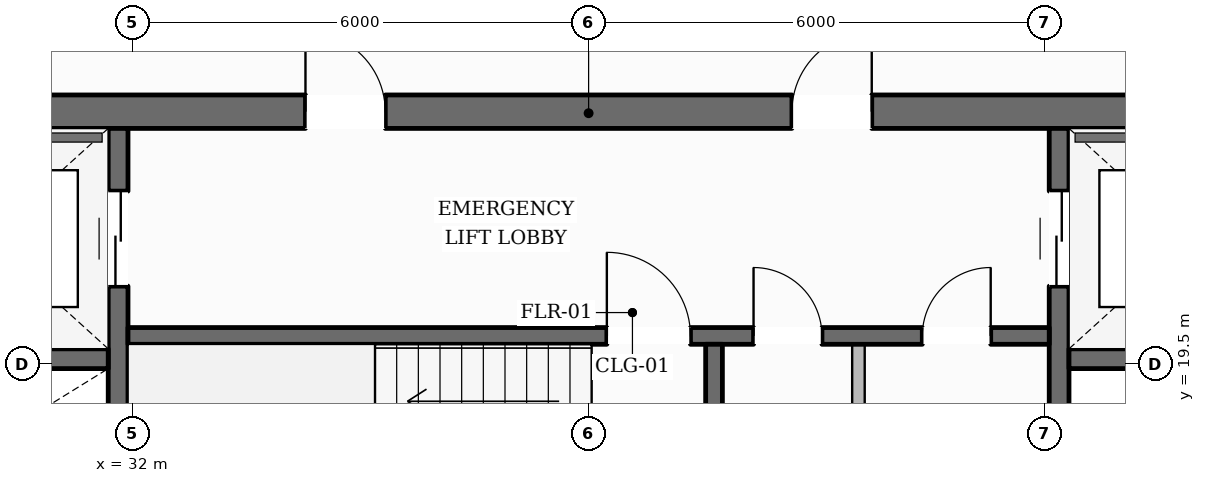
"""IFC4 building model, lengths in metres.
Left out: names, types, materials, properties, quantities, classifications, styles, units other than length and angle.
Written with IfcOpenShell. Run it as: python <this file> out.ifc"""

import sys

from ifc_helpers import new_model, si_unit, direction, frame, frame_2d, origin, place, context, subcontext, project, spatial, rectangle, extrude, element, fill, save


model = new_model("IFC4")
c1 = context("Model", 3, precision=1e-05, world=origin(), true_north=direction((0.0, 1.0)))
c2 = subcontext(c1, "Body", "Model", "MODEL_VIEW")
j1 = project(units=[si_unit("LENGTHUNIT", "METRE"), si_unit("PLANEANGLEUNIT", "RADIAN")], contexts=[c1])
p1 = place(None, origin())
s1 = spatial("IfcSite", under=j1, at=p1, CompositionType="ELEMENT")
p2 = place(p1, origin())
s2 = spatial("IfcBuilding", under=s1, at=p2, CompositionType="ELEMENT")
p3 = place(p2, frame((0.0, 0.0, 207.35)))
s3 = spatial("IfcBuildingStorey", under=s2, at=p3, CompositionType="ELEMENT", Elevation=207.35)
p4 = place(p3, frame((28.04, 22.82, 0.0), z_axis=(0.0, 0.0, 1.0), x_axis=(1.0, 0.0, 0.0)))
e1 = element("IfcWall", 1, at=p4, inside=s3, PredefinedType="SOLIDWALL", context=c2, shape_type="SweptSolid", body=[
    extrude(rectangle(XDim=19.92, YDim=0.44, at=frame_2d((9.96, 0.0))), origin(), (0.0, 0.0, 1.0), 3.6),
])
p5 = place(p4, frame((6.235, 0.0, 0.0)))
e2 = element("IfcOpeningElement", 2, at=p5, cuts=e1, PredefinedType="OPENING", context=c2, shape_type="SweptSolid", body=[
    extrude(rectangle(XDim=1.05, YDim=2.15, at=frame_2d((0.525, 1.075))), frame((0.0, 0.23, 0.0), z_axis=(0.0, -1.0, 0.0), x_axis=(1.0, 0.0, 0.0)), (0.0, 0.0, 1.0), 0.46),
])
p6 = place(p4, frame((12.635, 0.0, 0.0)))
e3 = element("IfcOpeningElement", 3, at=p6, cuts=e1, PredefinedType="OPENING", context=c2, shape_type="SweptSolid", body=[
    extrude(rectangle(XDim=1.05, YDim=2.15, at=frame_2d((0.525, 1.075))), frame((0.0, 0.23, 0.0), z_axis=(0.0, -1.0, 0.0), x_axis=(1.0, 0.0, 0.0)), (0.0, 0.0, 1.0), 0.46),
])
p7 = place(p3, frame((31.81, 9.6, 0.0), z_axis=(0.0, 0.0, 1.0), x_axis=(0.0, 1.0, 0.0)))
e4 = element("IfcWall", 4, at=p7, inside=s3, PredefinedType="SHEAR", context=c2, shape_type="SweptSolid", body=[
    extrude(rectangle(XDim=13.0, YDim=0.26, at=frame_2d((6.5, 0.0))), origin(), (0.0, 0.0, 1.0), 3.6),
])
p8 = place(p7, frame((10.925, 0.0, 0.0)))
e5 = element("IfcOpeningElement", 5, at=p8, cuts=e4, PredefinedType="OPENING", context=c2, shape_type="SweptSolid", body=[
    extrude(rectangle(XDim=1.25, YDim=2.25, at=frame_2d((0.625, 1.125))), frame((0.0, 0.14, 0.0), z_axis=(0.0, -1.0, 0.0), x_axis=(1.0, 0.0, 0.0)), (0.0, 0.0, 1.0), 0.28),
])
p9 = place(p3, frame((44.19, 9.6, 0.0), z_axis=(0.0, 0.0, 1.0), x_axis=(0.0, 1.0, 0.0)))
e6 = element("IfcWall", 6, at=p9, inside=s3, PredefinedType="SHEAR", context=c2, shape_type="SweptSolid", body=[
    extrude(rectangle(XDim=13.0, YDim=0.26, at=frame_2d((6.5, 0.0))), origin(), (0.0, 0.0, 1.0), 3.6),
])
p10 = place(p9, frame((10.925, 0.0, 0.0)))
e7 = element("IfcOpeningElement", 7, at=p10, cuts=e6, PredefinedType="OPENING", context=c2, shape_type="SweptSolid", body=[
    extrude(rectangle(XDim=1.25, YDim=2.25, at=frame_2d((0.625, 1.125))), frame((0.0, 0.14, 0.0), z_axis=(0.0, -1.0, 0.0), x_axis=(1.0, 0.0, 0.0)), (0.0, 0.0, 1.0), 0.28),
])
for number, where, z_axis, x_axis in (
    (8, (28.48, 19.57, 0.0), (0.0, 0.0, 1.0), (1.0, 0.0, 0.0)),
    (9, (44.32, 19.57, 0.0), (0.0, 0.0, 1.0), (1.0, 0.0, 0.0)),
):
    element("IfcWall", number, at=place(p3, frame(where, z_axis=z_axis, x_axis=x_axis)), inside=s3, PredefinedType="SHEAR", context=c2, shape_type="SweptSolid", body=[
        extrude(rectangle(XDim=3.2, YDim=0.26, at=frame_2d((1.6, 0.0))), origin(), (0.0, 0.0, 1.0), 3.6),
    ])
p11 = place(p3, frame((31.94, 19.87, 0.0), z_axis=(0.0, 0.0, 1.0), x_axis=(1.0, 0.0, 0.0)))
e10 = element("IfcWall", 10, at=p11, inside=s3, PredefinedType="SOLIDWALL", context=c2, shape_type="SweptSolid", body=[
    extrude(rectangle(XDim=12.12, YDim=0.22, at=frame_2d((6.06, 0.0))), origin(), (0.0, 0.0, 1.0), 3.6),
])
p12 = place(p11, frame((6.3, 0.0, 0.0)))
e11 = element("IfcOpeningElement", 11, at=p12, cuts=e10, PredefinedType="OPENING", context=c2, shape_type="SweptSolid", body=[
    extrude(rectangle(XDim=1.1, YDim=2.15, at=frame_2d((0.55, 1.075))), frame((0.0, 0.12, 0.0), z_axis=(0.0, -1.0, 0.0), x_axis=(1.0, 0.0, 0.0)), (0.0, 0.0, 1.0), 0.24),
])
p13 = place(p11, frame((8.23, 0.0, 0.0)))
e12 = element("IfcOpeningElement", 12, at=p13, cuts=e10, PredefinedType="OPENING", context=c2, shape_type="SweptSolid", body=[
    extrude(rectangle(XDim=0.9, YDim=2.1, at=frame_2d((0.45, 1.05))), frame((0.0, 0.12, 0.0), z_axis=(0.0, -1.0, 0.0), x_axis=(1.0, 0.0, 0.0)), (0.0, 0.0, 1.0), 0.24),
])
p14 = place(p11, frame((10.45, 0.0, 0.0)))
e13 = element("IfcOpeningElement", 13, at=p14, cuts=e10, PredefinedType="OPENING", context=c2, shape_type="SweptSolid", body=[
    extrude(rectangle(XDim=0.9, YDim=2.1, at=frame_2d((0.45, 1.05))), frame((0.0, 0.12, 0.0), z_axis=(0.0, -1.0, 0.0), x_axis=(1.0, 0.0, 0.0)), (0.0, 0.0, 1.0), 0.24),
])
p15 = place(p3, frame((39.65, 16.56, 0.0), z_axis=(0.0, 0.0, 1.0), x_axis=(0.0, 1.0, 0.0)))
e14 = element("IfcWall", 14, at=p15, inside=s3, PredefinedType="SOLIDWALL", context=c2, shape_type="SweptSolid", body=[
    extrude(rectangle(XDim=3.2, YDim=0.22, at=frame_2d((1.6, 0.0))), origin(), (0.0, 0.0, 1.0), 3.6),
])
p16 = place(p3, frame((14.256, 11.0, 0.0), z_axis=(0.0, 0.0, 1.0), x_axis=(0.508231558921, 0.861220461042, 0.0)))
e15 = element("IfcWall", 15, at=p16, inside=s3, PredefinedType="STANDARD", context=c2, shape_type="SweptSolid", body=[
    extrude(rectangle(XDim=38.41, YDim=0.35, at=frame_2d((19.205, 0.0))), origin(), (0.0, 0.0, 1.0), 3.132),
])
p17 = place(p16, frame((34.091, 0.0, 0.65)))
e16 = element("IfcOpeningElement", 16, at=p17, cuts=e15, PredefinedType="OPENING", context=c2, shape_type="SweptSolid", body=[
    extrude(rectangle(XDim=1.45, YDim=1.75, at=frame_2d((0.725, 0.875))), frame((0.0, 0.185, 0.0), z_axis=(0.0, -1.0, 0.0), x_axis=(1.0, 0.0, 0.0)), (0.0, 0.0, 1.0), 0.37),
])
p18 = place(p16, frame((27.848, 0.0, 0.65)))
e17 = element("IfcOpeningElement", 17, at=p18, cuts=e15, PredefinedType="OPENING", context=c2, shape_type="SweptSolid", body=[
    extrude(rectangle(XDim=1.45, YDim=1.75, at=frame_2d((0.725, 0.875))), frame((0.0, 0.185, 0.0), z_axis=(0.0, -1.0, 0.0), x_axis=(1.0, 0.0, 0.0)), (0.0, 0.0, 1.0), 0.37),
])
p19 = place(p16, frame((21.606, 0.0, 0.65)))
e18 = element("IfcOpeningElement", 18, at=p19, cuts=e15, PredefinedType="OPENING", context=c2, shape_type="SweptSolid", body=[
    extrude(rectangle(XDim=1.45, YDim=1.75, at=frame_2d((0.725, 0.875))), frame((0.0, 0.185, 0.0), z_axis=(0.0, -1.0, 0.0), x_axis=(1.0, 0.0, 0.0)), (0.0, 0.0, 1.0), 0.37),
])
p20 = place(p16, frame((9.121, 0.0, 0.65)))
e19 = element("IfcOpeningElement", 19, at=p20, cuts=e15, PredefinedType="OPENING", context=c2, shape_type="SweptSolid", body=[
    extrude(rectangle(XDim=1.45, YDim=1.75, at=frame_2d((0.725, 0.875))), frame((0.0, 0.185, 0.0), z_axis=(0.0, -1.0, 0.0), x_axis=(1.0, 0.0, 0.0)), (0.0, 0.0, 1.0), 0.37),
])
p21 = place(p16, frame((2.878, 0.0, 0.65)))
e20 = element("IfcOpeningElement", 20, at=p21, cuts=e15, PredefinedType="OPENING", context=c2, shape_type="SweptSolid", body=[
    extrude(rectangle(XDim=1.45, YDim=1.75, at=frame_2d((0.725, 0.875))), frame((0.0, 0.185, 0.0), z_axis=(0.0, -1.0, 0.0), x_axis=(1.0, 0.0, 0.0)), (0.0, 0.0, 1.0), 0.37),
])
p22 = place(p3, frame((42.167, 44.113, 0.0), z_axis=(0.0, 0.0, 1.0), x_axis=(0.50509390827, -0.863064391473, 0.0)))
e21 = element("IfcWall", 21, at=p22, inside=s3, PredefinedType="STANDARD", context=c2, shape_type="SweptSolid", body=[
    extrude(rectangle(XDim=38.167, YDim=0.35, at=frame_2d((19.083, 0.0))), origin(), (0.0, 0.0, 1.0), 3.132),
])
p23 = place(p22, frame((28.025, 0.0, 0.0)))
e22 = element("IfcOpeningElement", 22, at=p23, cuts=e21, PredefinedType="OPENING", context=c2, shape_type="SweptSolid", body=[
    extrude(rectangle(XDim=1.0, YDim=2.2, at=frame_2d((0.5, 1.1))), frame((0.0, 0.185, 0.0), z_axis=(0.0, -1.0, 0.0), x_axis=(1.0, 0.0, 0.0)), (0.0, 0.0, 1.0), 0.37),
])
p24 = place(p22, frame((33.859, 0.0, 0.65)))
e23 = element("IfcOpeningElement", 23, at=p24, cuts=e21, PredefinedType="OPENING", context=c2, shape_type="SweptSolid", body=[
    extrude(rectangle(XDim=1.45, YDim=1.75, at=frame_2d((0.725, 0.875))), frame((0.0, 0.185, 0.0), z_axis=(0.0, -1.0, 0.0), x_axis=(1.0, 0.0, 0.0)), (0.0, 0.0, 1.0), 0.37),
])
p25 = place(p22, frame((21.456, 0.0, 0.65)))
e24 = element("IfcOpeningElement", 24, at=p25, cuts=e21, PredefinedType="OPENING", context=c2, shape_type="SweptSolid", body=[
    extrude(rectangle(XDim=1.45, YDim=1.75, at=frame_2d((0.725, 0.875))), frame((0.0, 0.185, 0.0), z_axis=(0.0, -1.0, 0.0), x_axis=(1.0, 0.0, 0.0)), (0.0, 0.0, 1.0), 0.37),
])
p26 = place(p22, frame((9.053, 0.0, 0.65)))
e25 = element("IfcOpeningElement", 25, at=p26, cuts=e21, PredefinedType="OPENING", context=c2, shape_type="SweptSolid", body=[
    extrude(rectangle(XDim=1.45, YDim=1.75, at=frame_2d((0.725, 0.875))), frame((0.0, 0.185, 0.0), z_axis=(0.0, -1.0, 0.0), x_axis=(1.0, 0.0, 0.0)), (0.0, 0.0, 1.0), 0.37),
])
p27 = place(p22, frame((2.852, 0.0, 0.65)))
e26 = element("IfcOpeningElement", 26, at=p27, cuts=e21, PredefinedType="OPENING", context=c2, shape_type="SweptSolid", body=[
    extrude(rectangle(XDim=1.45, YDim=1.75, at=frame_2d((0.725, 0.875))), frame((0.0, 0.185, 0.0), z_axis=(0.0, -1.0, 0.0), x_axis=(1.0, 0.0, 0.0)), (0.0, 0.0, 1.0), 0.37),
])
p28 = place(p3, frame((41.55, 16.56, 0.0), z_axis=(0.0, 0.0, 1.0), x_axis=(0.0, 1.0, 0.0)))
e27 = element("IfcWall", 27, at=p28, inside=s3, PredefinedType="PARTITIONING", context=c2, shape_type="SweptSolid", body=[
    extrude(rectangle(XDim=3.2, YDim=0.165, at=frame_2d((1.6, 0.0))), origin(), (0.0, 0.0, 1.0), 3.6),
])
p29 = place(p12, origin())
e28 = element("IfcDoor", 28, at=p29, inside=s3, OperationType="SINGLE_SWING_LEFT", PredefinedType="DOOR", context=c2, shape_type="SweptSolid", body=[
    extrude(rectangle(XDim=1.1, YDim=2.15, at=frame_2d((0.55, 1.075))), frame((0.0, 0.025, 0.0), z_axis=(0.0, -1.0, 0.0), x_axis=(1.0, 0.0, 0.0)), (0.0, 0.0, 1.0), 0.05),
])
fill(e11, e28)
p30 = place(p5, origin())
e29 = element("IfcDoor", 29, at=p30, inside=s3, OperationType="SINGLE_SWING_LEFT", PredefinedType="DOOR", context=c2, shape_type="SweptSolid", body=[
    extrude(rectangle(XDim=1.05, YDim=2.15, at=frame_2d((0.525, 1.075))), frame((0.0, 0.025, 0.0), z_axis=(0.0, -1.0, 0.0), x_axis=(1.0, 0.0, 0.0)), (0.0, 0.0, 1.0), 0.05),
])
fill(e2, e29)
p31 = place(p6, origin())
e30 = element("IfcDoor", 30, at=p31, inside=s3, OperationType="SINGLE_SWING_RIGHT", PredefinedType="DOOR", context=c2, shape_type="SweptSolid", body=[
    extrude(rectangle(XDim=1.05, YDim=2.15, at=frame_2d((0.525, 1.075))), frame((0.0, 0.025, 0.0), z_axis=(0.0, -1.0, 0.0), x_axis=(1.0, 0.0, 0.0)), (0.0, 0.0, 1.0), 0.05),
])
fill(e3, e30)
p32 = place(p8, origin())
e31 = element("IfcDoor", 31, at=p32, inside=s3, OperationType="DOUBLE_DOOR_SLIDING", PredefinedType="DOOR", context=c2, shape_type="SweptSolid", body=[
    extrude(rectangle(XDim=1.25, YDim=2.25, at=frame_2d((0.625, 1.125))), frame((0.0, 0.025, 0.0), z_axis=(0.0, -1.0, 0.0), x_axis=(1.0, 0.0, 0.0)), (0.0, 0.0, 1.0), 0.05),
])
fill(e5, e31)
p33 = place(p10, origin())
e32 = element("IfcDoor", 32, at=p33, inside=s3, OperationType="DOUBLE_DOOR_SLIDING", PredefinedType="DOOR", context=c2, shape_type="SweptSolid", body=[
    extrude(rectangle(XDim=1.25, YDim=2.25, at=frame_2d((0.625, 1.125))), frame((0.0, 0.025, 0.0), z_axis=(0.0, -1.0, 0.0), x_axis=(1.0, 0.0, 0.0)), (0.0, 0.0, 1.0), 0.05),
])
fill(e7, e32)
p34 = place(p13, origin())
e33 = element("IfcDoor", 33, at=p34, inside=s3, OperationType="SINGLE_SWING_LEFT", PredefinedType="DOOR", context=c2, shape_type="SweptSolid", body=[
    extrude(rectangle(XDim=0.9, YDim=2.1, at=frame_2d((0.45, 1.05))), frame((0.0, 0.025, 0.0), z_axis=(0.0, -1.0, 0.0), x_axis=(1.0, 0.0, 0.0)), (0.0, 0.0, 1.0), 0.05),
])
fill(e12, e33)
p35 = place(p14, origin())
e34 = element("IfcDoor", 34, at=p35, inside=s3, OperationType="SINGLE_SWING_RIGHT", PredefinedType="DOOR", context=c2, shape_type="SweptSolid", body=[
    extrude(rectangle(XDim=0.9, YDim=2.1, at=frame_2d((0.45, 1.05))), frame((0.0, 0.025, 0.0), z_axis=(0.0, -1.0, 0.0), x_axis=(1.0, 0.0, 0.0)), (0.0, 0.0, 1.0), 0.05),
])
fill(e13, e34)
save(model, sys.argv[1])
